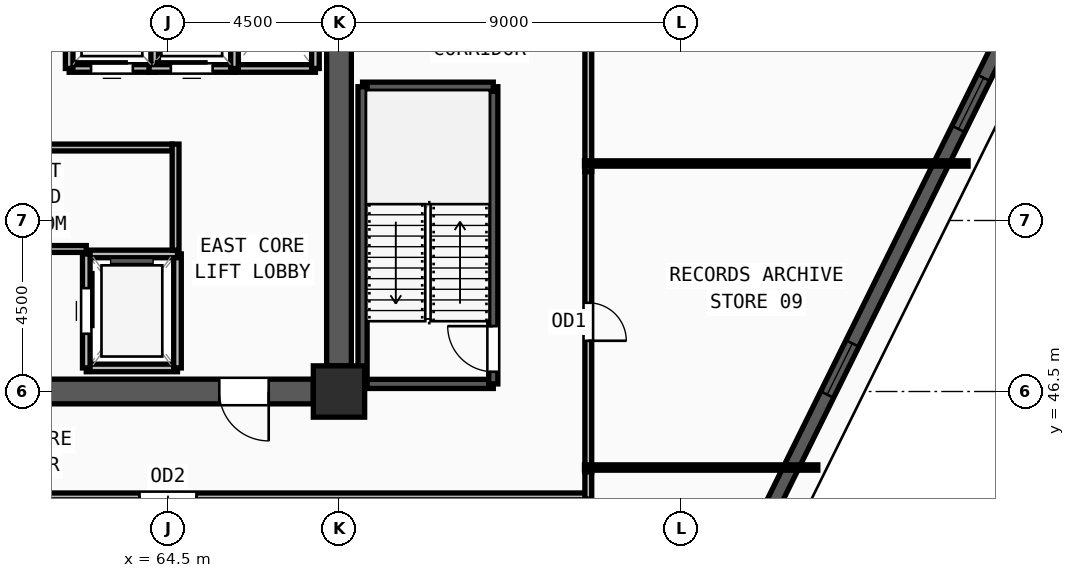
"""IFC4 building model, lengths in metres.
Left out: names, types, materials, properties, quantities, classifications, styles, units other than length and angle.
Written with IfcOpenShell. Run it as: python <this file> out.ifc"""

import sys

from ifc_helpers import new_model, si_unit, direction, frame, frame_2d, origin, origin_2d, place, context, subcontext, project, spatial, rectangle, extrude, source, transform, mapped, element, fill, save


model = new_model("IFC4")
c1 = context("Model", 3, precision=1e-05, world=origin(), true_north=direction((0.0, 1.0)))
c2 = subcontext(c1, "Body", "Model", "MODEL_VIEW")
j1 = project(units=[si_unit("LENGTHUNIT", "METRE"), si_unit("PLANEANGLEUNIT", "RADIAN")], contexts=[c1])
p1 = place(None, origin())
s1 = spatial("IfcSite", under=j1, at=p1, CompositionType="ELEMENT")
p2 = place(p1, origin())
s2 = spatial("IfcBuilding", under=s1, at=p2, CompositionType="ELEMENT")
p3 = place(p2, frame((0.0, 0.0, 258.75)))
s3 = spatial("IfcBuildingStorey", under=s2, at=p3, CompositionType="ELEMENT", Elevation=258.75)
m1 = source(origin(), c2, "Body", "SweptSolid", [
    extrude(rectangle(XDim=1.35, YDim=1.35, at=origin_2d()), origin(), (0.0, 0.0, 1.0), 3.75),
])
p4 = place(p3, frame((69.0, 46.5, 0.0), z_axis=(0.0, 0.0, 1.0), x_axis=(1.0, 0.0, 0.0)))
e1 = element("IfcColumn", 1, at=p4, inside=s3, PredefinedType="COLUMN", context=c2, shape_type="MappedRepresentation", body=[
    mapped(m1, transform((0.0, 0.0, 0.0), x_axis=(1.0, 0.0, 0.0), y_axis=(0.0, 1.0, 0.0), z_axis=(0.0, 0.0, 1.0), scale=1.0)),
])
p5 = place(p3, frame((79.1, 40.865, 0.0), z_axis=(0.0, 0.0, 1.0), x_axis=(0.44309993188, 0.896472225096, 0.0)))
e2 = element("IfcWall", 2, at=p5, inside=s3, PredefinedType="SOLIDWALL", context=c2, shape_type="SweptSolid", body=[
    extrude(rectangle(XDim=27.783, YDim=0.38, at=frame_2d((13.892, 0.0))), origin(), (0.0, 0.0, 1.0), 3.57),
])
m2 = source(origin(), c2, "Body", "SweptSolid", [
    extrude(rectangle(XDim=1.5, YDim=1.9, at=frame_2d((0.75, 0.95))), frame((0.0, 0.2, 0.0), z_axis=(0.0, -1.0, 0.0), x_axis=(1.0, 0.0, 0.0)), (0.0, 0.0, 1.0), 0.4),
])
p6 = place(p5, frame((6.196, 0.0, 0.55)))
e3 = element("IfcOpeningElement", 3, at=p6, cuts=e2, PredefinedType="OPENING", context=c2, shape_type="MappedRepresentation", body=[
    mapped(m2, transform((0.0, 0.0, 0.0), x_axis=(1.0, 0.0, 0.0), y_axis=(0.0, 1.0, 0.0), z_axis=(0.0, 0.0, 1.0), scale=1.0)),
])
p7 = place(p5, frame((13.992, 0.0, 0.55)))
e4 = element("IfcOpeningElement", 4, at=p7, cuts=e2, PredefinedType="OPENING", context=c2, shape_type="MappedRepresentation", body=[
    mapped(m2, transform((0.0, 0.0, 0.0), x_axis=(1.0, 0.0, 0.0), y_axis=(0.0, 1.0, 0.0), z_axis=(0.0, 0.0, 1.0), scale=1.0)),
])
p8 = place(p5, frame((20.088, 0.0, 0.55)))
e5 = element("IfcOpeningElement", 5, at=p8, cuts=e2, PredefinedType="OPENING", context=c2, shape_type="MappedRepresentation", body=[
    mapped(m2, transform((0.0, 0.0, 0.0), x_axis=(1.0, 0.0, 0.0), y_axis=(0.0, 1.0, 0.0), z_axis=(0.0, 0.0, 1.0), scale=1.0)),
])
p9 = place(p3, frame((69.0, 60.825, 0.0), z_axis=(0.0, 0.0, 1.0), x_axis=(0.0, -1.0, 0.0)))
e6 = element("IfcWall", 6, at=p9, inside=s3, PredefinedType="SHEAR", context=c2, shape_type="SweptSolid", body=[
    extrude(rectangle(XDim=13.65, YDim=0.65, at=frame_2d((6.825, 0.0))), origin(), (0.0, 0.0, 1.0), 3.57),
])
m3 = source(origin(), c2, "Body", "SweptSolid", [
    extrude(rectangle(XDim=1.2, YDim=2.2, at=frame_2d((0.6, 1.1))), frame((0.0, 0.335, 0.0), z_axis=(0.0, -1.0, 0.0), x_axis=(1.0, 0.0, 0.0)), (0.0, 0.0, 1.0), 0.67),
])
p10 = place(p9, frame((1.275, 0.0, 0.0)))
e7 = element("IfcOpeningElement", 7, at=p10, cuts=e6, PredefinedType="OPENING", context=c2, shape_type="MappedRepresentation", body=[
    mapped(m3, transform((0.0, 0.0, 0.0), x_axis=(1.0, 0.0, 0.0), y_axis=(0.0, 1.0, 0.0), z_axis=(0.0, 0.0, 1.0), scale=1.0)),
])
p11 = place(p3, frame((68.325, 46.5, 0.0), z_axis=(0.0, 0.0, 1.0), x_axis=(-1.0, 0.0, 0.0)))
e8 = element("IfcWall", 8, at=p11, inside=s3, PredefinedType="SHEAR", context=c2, shape_type="SweptSolid", body=[
    extrude(rectangle(XDim=7.65, YDim=0.65, at=frame_2d((3.825, 0.0))), origin(), (0.0, 0.0, 1.0), 3.57),
])
m4 = source(origin(), c2, "Body", "SweptSolid", [
    extrude(rectangle(XDim=1.3, YDim=2.2, at=frame_2d((0.65, 1.1))), frame((0.0, 0.335, 0.0), z_axis=(0.0, -1.0, 0.0), x_axis=(1.0, 0.0, 0.0)), (0.0, 0.0, 1.0), 0.67),
])
p12 = place(p11, frame((1.175, 0.0, 0.0)))
e9 = element("IfcOpeningElement", 9, at=p12, cuts=e8, PredefinedType="OPENING", context=c2, shape_type="MappedRepresentation", body=[
    mapped(m4, transform((0.0, 0.0, 0.0), x_axis=(1.0, 0.0, 0.0), y_axis=(0.0, 1.0, 0.0), z_axis=(0.0, 0.0, 1.0), scale=1.0)),
])
p13 = place(p3, frame((69.62, 46.7, 0.0), z_axis=(0.0, 0.0, 1.0), x_axis=(1.0, 0.0, 0.0)))
e10 = element("IfcWall", 10, at=p13, inside=s3, PredefinedType="SOLIDWALL", context=c2, shape_type="SweptSolid", body=[
    extrude(rectangle(XDim=3.44, YDim=0.24, at=frame_2d((1.72, 0.0))), origin(), (0.0, 0.0, 1.0), 3.57),
])
p14 = place(p3, frame((73.06, 46.7, 0.0), z_axis=(0.0, 0.0, 1.0), x_axis=(0.0, 1.0, 0.0)))
e11 = element("IfcWall", 11, at=p14, inside=s3, PredefinedType="SOLIDWALL", context=c2, shape_type="SweptSolid", body=[
    extrude(rectangle(XDim=7.82, YDim=0.24, at=frame_2d((3.91, 0.0))), origin(), (0.0, 0.0, 1.0), 3.57),
])
m5 = source(origin(), c2, "Body", "SweptSolid", [
    extrude(rectangle(XDim=1.2, YDim=2.2, at=frame_2d((0.6, 1.1))), frame((0.0, 0.13, 0.0), z_axis=(0.0, -1.0, 0.0), x_axis=(1.0, 0.0, 0.0)), (0.0, 0.0, 1.0), 0.26),
])
p15 = place(p14, frame((0.32, 0.0, 0.0)))
e12 = element("IfcOpeningElement", 12, at=p15, cuts=e11, PredefinedType="OPENING", context=c2, shape_type="MappedRepresentation", body=[
    mapped(m5, transform((0.0, 0.0, 0.0), x_axis=(1.0, 0.0, 0.0), y_axis=(0.0, 1.0, 0.0), z_axis=(0.0, 0.0, 1.0), scale=1.0)),
])
p16 = place(p3, frame((73.06, 54.52, 0.0), z_axis=(0.0, 0.0, 1.0), x_axis=(-1.0, 0.0, 0.0)))
e13 = element("IfcWall", 13, at=p16, inside=s3, PredefinedType="SOLIDWALL", context=c2, shape_type="SweptSolid", body=[
    extrude(rectangle(XDim=3.44, YDim=0.24, at=frame_2d((1.72, 0.0))), origin(), (0.0, 0.0, 1.0), 3.57),
])
p17 = place(p3, frame((69.62, 54.52, 0.0), z_axis=(0.0, 0.0, 1.0), x_axis=(0.0, -1.0, 0.0)))
e14 = element("IfcWall", 14, at=p17, inside=s3, PredefinedType="SOLIDWALL", context=c2, shape_type="SweptSolid", body=[
    extrude(rectangle(XDim=7.82, YDim=0.24, at=frame_2d((3.91, 0.0))), origin(), (0.0, 0.0, 1.0), 3.57),
])
p18 = place(p3, frame((62.35, 47.12, 0.0), z_axis=(0.0, 0.0, 1.0), x_axis=(1.0, 0.0, 0.0)))
e15 = element("IfcWall", 15, at=p18, inside=s3, PredefinedType="SOLIDWALL", context=c2, shape_type="SweptSolid", body=[
    extrude(rectangle(XDim=2.4, YDim=0.2, at=frame_2d((1.2, 0.0))), origin(), (0.0, 0.0, 1.0), 3.57),
])
p19 = place(p3, frame((64.75, 47.12, 0.0), z_axis=(0.0, 0.0, 1.0), x_axis=(0.0, 1.0, 0.0)))
e16 = element("IfcWall", 16, at=p19, inside=s3, PredefinedType="SOLIDWALL", context=c2, shape_type="SweptSolid", body=[
    extrude(rectangle(XDim=3.0, YDim=0.2, at=frame_2d((1.5, 0.0))), origin(), (0.0, 0.0, 1.0), 3.57),
])
p20 = place(p3, frame((64.75, 50.12, 0.0), z_axis=(0.0, 0.0, 1.0), x_axis=(-1.0, 0.0, 0.0)))
e17 = element("IfcWall", 17, at=p20, inside=s3, PredefinedType="SOLIDWALL", context=c2, shape_type="SweptSolid", body=[
    extrude(rectangle(XDim=2.4, YDim=0.2, at=frame_2d((1.2, 0.0))), origin(), (0.0, 0.0, 1.0), 3.57),
])
p21 = place(p3, frame((62.35, 50.12, 0.0), z_axis=(0.0, 0.0, 1.0), x_axis=(0.0, -1.0, 0.0)))
e18 = element("IfcWall", 18, at=p21, inside=s3, PredefinedType="SOLIDWALL", context=c2, shape_type="SweptSolid", body=[
    extrude(rectangle(XDim=3.0, YDim=0.2, at=frame_2d((1.5, 0.0))), origin(), (0.0, 0.0, 1.0), 3.57),
])
m6 = source(origin(), c2, "Body", "SweptSolid", [
    extrude(rectangle(XDim=1.2, YDim=2.3, at=frame_2d((0.6, 1.15))), frame((0.0, 0.11, 0.0), z_axis=(0.0, -1.0, 0.0), x_axis=(1.0, 0.0, 0.0)), (0.0, 0.0, 1.0), 0.22),
])
p22 = place(p21, frame((0.9, 0.0, 0.0)))
e19 = element("IfcOpeningElement", 19, at=p22, cuts=e18, PredefinedType="OPENING", context=c2, shape_type="MappedRepresentation", body=[
    mapped(m6, transform((0.0, 0.0, 0.0), x_axis=(1.0, 0.0, 0.0), y_axis=(0.0, 1.0, 0.0), z_axis=(0.0, 0.0, 1.0), scale=1.0)),
])
p23 = place(p3, frame((66.2, 55.0, 0.0), z_axis=(0.0, 0.0, 1.0), x_axis=(1.0, 0.0, 0.0)))
e20 = element("IfcWall", 20, at=p23, inside=s3, PredefinedType="SOLIDWALL", context=c2, shape_type="SweptSolid", body=[
    extrude(rectangle(XDim=2.18, YDim=0.2, at=frame_2d((1.09, 0.0))), origin(), (0.0, 0.0, 1.0), 3.57),
])
p24 = place(p3, frame((68.38, 55.0, 0.0), z_axis=(0.0, 0.0, 1.0), x_axis=(0.0, 1.0, 0.0)))
e21 = element("IfcWall", 21, at=p24, inside=s3, PredefinedType="SOLIDWALL", context=c2, shape_type="SweptSolid", body=[
    extrude(rectangle(XDim=2.75, YDim=0.2, at=frame_2d((1.375, 0.0))), origin(), (0.0, 0.0, 1.0), 3.57),
])
p25 = place(p3, frame((61.9, 55.0, 0.0), z_axis=(0.0, 0.0, 1.0), x_axis=(1.0, 0.0, 0.0)))
e22 = element("IfcWall", 22, at=p25, inside=s3, PredefinedType="SOLIDWALL", context=c2, shape_type="SweptSolid", body=[
    extrude(rectangle(XDim=2.25, YDim=0.2, at=frame_2d((1.125, 0.0))), origin(), (0.0, 0.0, 1.0), 3.57),
])
m7 = source(origin(), c2, "Body", "SweptSolid", [
    extrude(rectangle(XDim=1.1, YDim=2.2, at=frame_2d((0.55, 1.1))), frame((0.0, 0.11, 0.0), z_axis=(0.0, -1.0, 0.0), x_axis=(1.0, 0.0, 0.0)), (0.0, 0.0, 1.0), 0.22),
])
p26 = place(p25, frame((0.575, 0.0, 0.0)))
e23 = element("IfcOpeningElement", 23, at=p26, cuts=e22, PredefinedType="OPENING", context=c2, shape_type="MappedRepresentation", body=[
    mapped(m7, transform((0.0, 0.0, 0.0), x_axis=(1.0, 0.0, 0.0), y_axis=(0.0, 1.0, 0.0), z_axis=(0.0, 0.0, 1.0), scale=1.0)),
])
for number, where, z_axis, x_axis in (
    (24, (64.15, 55.0, 0.0), (0.0, 0.0, 1.0), (0.0, 1.0, 0.0)),
    (25, (61.9, 57.6, 0.0), (0.0, 0.0, 1.0), (0.0, -1.0, 0.0)),
):
    element("IfcWall", number, at=place(p3, frame(where, z_axis=z_axis, x_axis=x_axis)), inside=s3, PredefinedType="SOLIDWALL", context=c2, shape_type="SweptSolid", body=[
        extrude(rectangle(XDim=2.6, YDim=0.2, at=frame_2d((1.3, 0.0))), origin(), (0.0, 0.0, 1.0), 3.57),
    ])
p27 = place(p3, frame((64.0, 55.0, 0.0), z_axis=(0.0, 0.0, 1.0), x_axis=(1.0, 0.0, 0.0)))
e26 = element("IfcWall", 26, at=p27, inside=s3, PredefinedType="SOLIDWALL", context=c2, shape_type="SweptSolid", body=[
    extrude(rectangle(XDim=2.25, YDim=0.2, at=frame_2d((1.125, 0.0))), origin(), (0.0, 0.0, 1.0), 3.57),
])
p28 = place(p27, frame((0.575, 0.0, 0.0)))
e27 = element("IfcOpeningElement", 27, at=p28, cuts=e26, PredefinedType="OPENING", context=c2, shape_type="MappedRepresentation", body=[
    mapped(m7, transform((0.0, 0.0, 0.0), x_axis=(1.0, 0.0, 0.0), y_axis=(0.0, 1.0, 0.0), z_axis=(0.0, 0.0, 1.0), scale=1.0)),
])
p29 = place(p3, frame((66.25, 55.0, 0.0), z_axis=(0.0, 0.0, 1.0), x_axis=(0.0, 1.0, 0.0)))
e28 = element("IfcWall", 28, at=p29, inside=s3, PredefinedType="SOLIDWALL", context=c2, shape_type="SweptSolid", body=[
    extrude(rectangle(XDim=2.6, YDim=0.2, at=frame_2d((1.3, 0.0))), origin(), (0.0, 0.0, 1.0), 3.57),
])
p30 = place(p3, frame((55.37, 52.92, 0.0), z_axis=(0.0, 0.0, 1.0), x_axis=(1.0, 0.0, 0.0)))
e29 = element("IfcWall", 29, at=p30, inside=s3, PredefinedType="PARTITIONING", context=c2, shape_type="SweptSolid", body=[
    extrude(rectangle(XDim=9.24, YDim=0.18, at=frame_2d((4.62, 0.0))), origin(), (0.0, 0.0, 1.0), 3.57),
])
m8 = source(origin(), c2, "Body", "SweptSolid", [
    extrude(rectangle(XDim=0.85, YDim=2.1, at=frame_2d((0.425, 1.05))), frame((0.0, 0.1, 0.0), z_axis=(0.0, -1.0, 0.0), x_axis=(1.0, 0.0, 0.0)), (0.0, 0.0, 1.0), 0.2),
])
p31 = place(p30, frame((4.205, 0.0, 0.0)))
e30 = element("IfcOpeningElement", 30, at=p31, cuts=e29, PredefinedType="OPENING", context=c2, shape_type="MappedRepresentation", body=[
    mapped(m8, transform((0.0, 0.0, 0.0), x_axis=(1.0, 0.0, 0.0), y_axis=(0.0, 1.0, 0.0), z_axis=(0.0, 0.0, 1.0), scale=1.0)),
])
p32 = place(p3, frame((75.56, 61.215, 0.0), z_axis=(0.0, 0.0, 1.0), x_axis=(0.0, -1.0, 0.0)))
e31 = element("IfcWall", 31, at=p32, inside=s3, PredefinedType="PARTITIONING", context=c2, shape_type="SweptSolid", body=[
    extrude(rectangle(XDim=8.93, YDim=0.18, at=frame_2d((4.465, 0.0))), origin(), (0.0, 0.0, 1.0), 3.57),
])
m9 = source(origin(), c2, "Body", "SweptSolid", [
    extrude(rectangle(XDim=1.0, YDim=2.2, at=frame_2d((0.5, 1.1))), frame((0.0, 0.1, 0.0), z_axis=(0.0, -1.0, 0.0), x_axis=(1.0, 0.0, 0.0)), (0.0, 0.0, 1.0), 0.2),
])
p33 = place(p32, frame((3.965, 0.0, 0.0)))
e32 = element("IfcOpeningElement", 32, at=p33, cuts=e31, PredefinedType="OPENING", context=c2, shape_type="MappedRepresentation", body=[
    mapped(m9, transform((0.0, 0.0, 0.0), x_axis=(1.0, 0.0, 0.0), y_axis=(0.0, 1.0, 0.0), z_axis=(0.0, 0.0, 1.0), scale=1.0)),
])
p34 = place(p3, frame((75.63, 43.74, 0.0), z_axis=(0.0, 0.0, 1.0), x_axis=(-1.0, 0.0, 0.0)))
e33 = element("IfcWall", 33, at=p34, inside=s3, PredefinedType="PARTITIONING", context=c2, shape_type="SweptSolid", body=[
    extrude(rectangle(XDim=31.26, YDim=0.18, at=frame_2d((15.63, 0.0))), origin(), (0.0, 0.0, 1.0), 3.57),
])
m10 = source(origin(), c2, "Body", "SweptSolid", [
    extrude(rectangle(XDim=1.5, YDim=2.2, at=frame_2d((0.75, 1.1))), frame((0.0, 0.1, 0.0), z_axis=(0.0, -1.0, 0.0), x_axis=(1.0, 0.0, 0.0)), (0.0, 0.0, 1.0), 0.2),
])
p35 = place(p34, frame((10.38, 0.0, 0.0)))
e34 = element("IfcOpeningElement", 34, at=p35, cuts=e33, PredefinedType="OPENING", context=c2, shape_type="MappedRepresentation", body=[
    mapped(m10, transform((0.0, 0.0, 0.0), x_axis=(1.0, 0.0, 0.0), y_axis=(0.0, 1.0, 0.0), z_axis=(0.0, 0.0, 1.0), scale=1.0)),
])
p36 = place(p3, frame((75.56, 52.285, 0.0), z_axis=(0.0, 0.0, 1.0), x_axis=(0.0, -1.0, 0.0)))
e35 = element("IfcWall", 35, at=p36, inside=s3, PredefinedType="PARTITIONING", context=c2, shape_type="SweptSolid", body=[
    extrude(rectangle(XDim=7.9, YDim=0.18, at=frame_2d((3.95, 0.0))), origin(), (0.0, 0.0, 1.0), 3.57),
])
p37 = place(p36, frame((3.45, 0.0, 0.0)))
e36 = element("IfcOpeningElement", 36, at=p37, cuts=e35, PredefinedType="OPENING", context=c2, shape_type="MappedRepresentation", body=[
    mapped(m9, transform((0.0, 0.0, 0.0), x_axis=(1.0, 0.0, 0.0), y_axis=(0.0, 1.0, 0.0), z_axis=(0.0, 0.0, 1.0), scale=1.0)),
])
p38 = place(p3, frame((75.56, 44.385, 0.0), z_axis=(0.0, 0.0, 1.0), x_axis=(0.0, -1.0, 0.0)))
e37 = element("IfcWall", 37, at=p38, inside=s3, PredefinedType="PARTITIONING", context=c2, shape_type="SweptSolid", body=[
    extrude(rectangle(XDim=0.715, YDim=0.18, at=frame_2d((0.357, 0.0))), origin(), (0.0, 0.0, 1.0), 3.57),
])
p39 = place(p3, frame((75.46, 44.5, 0.0), z_axis=(0.0, 0.0, 1.0), x_axis=(1.0, 0.0, 0.0)))
e38 = element("IfcWall", 38, at=p39, inside=s3, PredefinedType="PARTITIONING", context=c2, shape_type="SweptSolid", body=[
    extrude(rectangle(XDim=6.14, YDim=0.14, at=frame_2d((3.07, 0.0))), origin(), (0.0, 0.0, 1.0), 3.57),
])
p40 = place(p3, frame((75.46, 52.5, 0.0), z_axis=(0.0, 0.0, 1.0), x_axis=(1.0, 0.0, 0.0)))
e39 = element("IfcWall", 39, at=p40, inside=s3, PredefinedType="PARTITIONING", context=c2, shape_type="SweptSolid", body=[
    extrude(rectangle(XDim=10.094, YDim=0.14, at=frame_2d((5.047, 0.0))), origin(), (0.0, 0.0, 1.0), 3.57),
])
p41 = place(p3, frame((64.7, 50.22, 0.0), z_axis=(0.0, 0.0, 1.0), x_axis=(0.0, 1.0, 0.0)))
e40 = element("IfcWall", 40, at=p41, inside=s3, PredefinedType="PARTITIONING", context=c2, shape_type="SweptSolid", body=[
    extrude(rectangle(XDim=2.79, YDim=0.18, at=frame_2d((1.395, 0.0))), origin(), (0.0, 0.0, 1.0), 3.57),
])
p42 = place(p3, frame((57.65, 50.25, 0.0), z_axis=(0.0, 0.0, 1.0), x_axis=(1.0, 0.0, 0.0)))
e41 = element("IfcWall", 41, at=p42, inside=s3, PredefinedType="PARTITIONING", context=c2, shape_type="SweptSolid", body=[
    extrude(rectangle(XDim=4.7, YDim=0.18, at=frame_2d((2.35, 0.0))), origin(), (0.0, 0.0, 1.0), 3.57),
])
m11 = source(origin(), c2, "Body", "SweptSolid", [
    extrude(rectangle(XDim=1.5, YDim=1.9, at=frame_2d((0.75, 0.95))), frame((0.0, 0.03, 0.0), z_axis=(0.0, -1.0, 0.0), x_axis=(1.0, 0.0, 0.0)), (0.0, 0.0, 1.0), 0.06),
])
p43 = place(p6, origin())
e42 = element("IfcWindow", 42, at=p43, inside=s3, PartitioningType="DOUBLE_PANEL_VERTICAL", PredefinedType="WINDOW", context=c2, shape_type="MappedRepresentation", body=[
    mapped(m11, transform((0.0, 0.0, 0.0), x_axis=(1.0, 0.0, 0.0), y_axis=(0.0, 1.0, 0.0), z_axis=(0.0, 0.0, 1.0), scale=1.0)),
])
fill(e3, e42)
p44 = place(p7, origin())
e43 = element("IfcWindow", 43, at=p44, inside=s3, PartitioningType="DOUBLE_PANEL_VERTICAL", PredefinedType="WINDOW", context=c2, shape_type="MappedRepresentation", body=[
    mapped(m11, transform((0.0, 0.0, 0.0), x_axis=(1.0, 0.0, 0.0), y_axis=(0.0, 1.0, 0.0), z_axis=(0.0, 0.0, 1.0), scale=1.0)),
])
fill(e4, e43)
m12 = source(origin(), c2, "Body", "SweptSolid", [
    extrude(rectangle(XDim=1.3, YDim=2.2, at=frame_2d((0.65, 1.1))), frame((0.0, 0.025, 0.0), z_axis=(0.0, -1.0, 0.0), x_axis=(1.0, 0.0, 0.0)), (0.0, 0.0, 1.0), 0.05),
])
p45 = place(p12, origin())
e44 = element("IfcDoor", 44, at=p45, inside=s3, OperationType="SINGLE_SWING_LEFT", PredefinedType="DOOR", context=c2, shape_type="MappedRepresentation", body=[
    mapped(m12, transform((0.0, 0.0, 0.0), x_axis=(1.0, 0.0, 0.0), y_axis=(0.0, 1.0, 0.0), z_axis=(0.0, 0.0, 1.0), scale=1.0)),
])
fill(e9, e44)
m13 = source(origin(), c2, "Body", "SweptSolid", [
    extrude(rectangle(XDim=1.2, YDim=2.2, at=frame_2d((0.6, 1.1))), frame((0.0, 0.025, 0.0), z_axis=(0.0, -1.0, 0.0), x_axis=(1.0, 0.0, 0.0)), (0.0, 0.0, 1.0), 0.05),
])
p46 = place(p15, origin())
e45 = element("IfcDoor", 45, at=p46, inside=s3, OperationType="SINGLE_SWING_RIGHT", PredefinedType="DOOR", context=c2, shape_type="MappedRepresentation", body=[
    mapped(m13, transform((0.0, 0.0, 0.0), x_axis=(1.0, 0.0, 0.0), y_axis=(0.0, 1.0, 0.0), z_axis=(0.0, 0.0, 1.0), scale=1.0)),
])
fill(e12, e45)
m14 = source(origin(), c2, "Body", "SweptSolid", [
    extrude(rectangle(XDim=1.2, YDim=2.3, at=frame_2d((0.6, 1.15))), frame((0.0, 0.025, 0.0), z_axis=(0.0, -1.0, 0.0), x_axis=(1.0, 0.0, 0.0)), (0.0, 0.0, 1.0), 0.05),
])
p47 = place(p22, origin())
e46 = element("IfcDoor", 46, at=p47, inside=s3, OperationType="SLIDING_TO_LEFT", PredefinedType="DOOR", context=c2, shape_type="MappedRepresentation", body=[
    mapped(m14, transform((0.0, 0.0, 0.0), x_axis=(1.0, 0.0, 0.0), y_axis=(0.0, 1.0, 0.0), z_axis=(0.0, 0.0, 1.0), scale=1.0)),
])
fill(e19, e46)
m15 = source(origin(), c2, "Body", "SweptSolid", [
    extrude(rectangle(XDim=1.1, YDim=2.2, at=frame_2d((0.55, 1.1))), frame((0.0, 0.025, 0.0), z_axis=(0.0, -1.0, 0.0), x_axis=(1.0, 0.0, 0.0)), (0.0, 0.0, 1.0), 0.05),
])
p48 = place(p26, origin())
e47 = element("IfcDoor", 47, at=p48, inside=s3, OperationType="SLIDING_TO_LEFT", PredefinedType="DOOR", context=c2, shape_type="MappedRepresentation", body=[
    mapped(m15, transform((0.0, 0.0, 0.0), x_axis=(1.0, 0.0, 0.0), y_axis=(0.0, 1.0, 0.0), z_axis=(0.0, 0.0, 1.0), scale=1.0)),
])
fill(e23, e47)
p49 = place(p28, origin())
e48 = element("IfcDoor", 48, at=p49, inside=s3, OperationType="SLIDING_TO_LEFT", PredefinedType="DOOR", context=c2, shape_type="MappedRepresentation", body=[
    mapped(m15, transform((0.0, 0.0, 0.0), x_axis=(1.0, 0.0, 0.0), y_axis=(0.0, 1.0, 0.0), z_axis=(0.0, 0.0, 1.0), scale=1.0)),
])
fill(e27, e48)
m16 = source(origin(), c2, "Body", "SweptSolid", [
    extrude(rectangle(XDim=1.5, YDim=2.2, at=frame_2d((0.75, 1.1))), frame((0.0, 0.025, 0.0), z_axis=(0.0, -1.0, 0.0), x_axis=(1.0, 0.0, 0.0)), (0.0, 0.0, 1.0), 0.05),
])
p50 = place(p35, origin())
e49 = element("IfcDoor", 49, at=p50, inside=s3, OperationType="DOUBLE_DOOR_SINGLE_SWING", PredefinedType="DOOR", context=c2, shape_type="MappedRepresentation", body=[
    mapped(m16, transform((0.0, 0.0, 0.0), x_axis=(1.0, 0.0, 0.0), y_axis=(0.0, 1.0, 0.0), z_axis=(0.0, 0.0, 1.0), scale=1.0)),
])
fill(e34, e49)
m17 = source(origin(), c2, "Body", "SweptSolid", [
    extrude(rectangle(XDim=1.0, YDim=2.2, at=frame_2d((0.5, 1.1))), frame((0.0, 0.025, 0.0), z_axis=(0.0, -1.0, 0.0), x_axis=(1.0, 0.0, 0.0)), (0.0, 0.0, 1.0), 0.05),
])
p51 = place(p37, origin())
e50 = element("IfcDoor", 50, at=p51, inside=s3, OperationType="SINGLE_SWING_RIGHT", PredefinedType="DOOR", context=c2, shape_type="MappedRepresentation", body=[
    mapped(m17, transform((0.0, 0.0, 0.0), x_axis=(1.0, 0.0, 0.0), y_axis=(0.0, 1.0, 0.0), z_axis=(0.0, 0.0, 1.0), scale=1.0)),
])
fill(e36, e50)
save(model, sys.argv[1])
